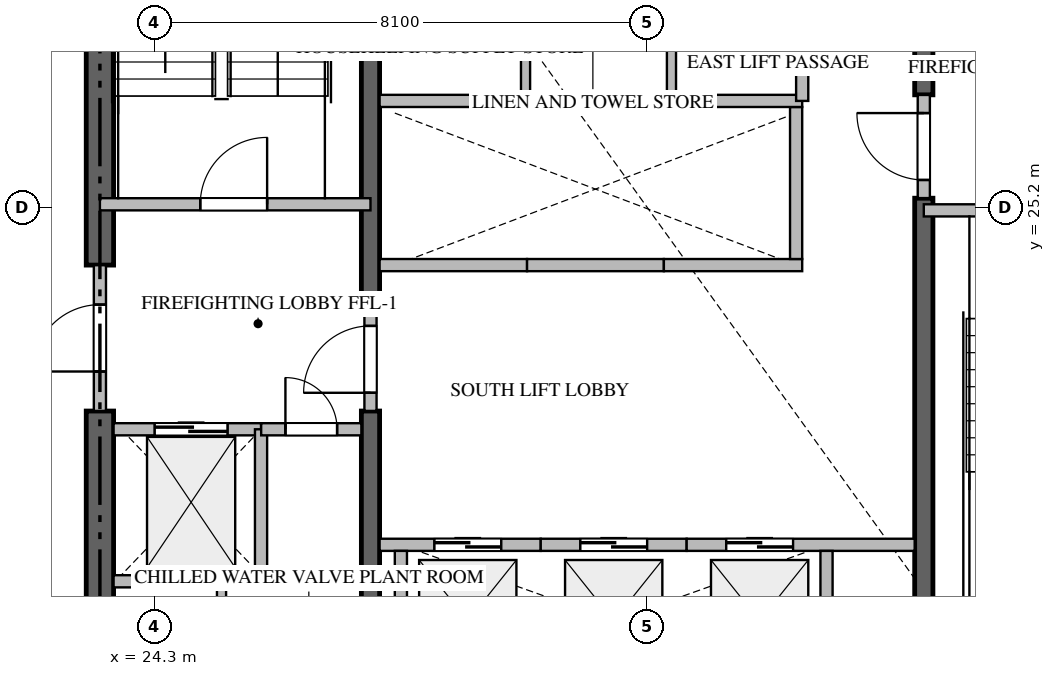
"""IFC4 building model, lengths in metres.
Left out: names, types, materials, properties, quantities, classifications, styles, units other than length and angle.
Written with IfcOpenShell. Run it as: python <this file> out.ifc"""

import sys

from ifc_helpers import new_model, si_unit, direction, frame, frame_2d, origin, place, context, subcontext, project, spatial, rectangle, extrude, source, transform, mapped, element, fill, save


model = new_model("IFC4")
c1 = context("Model", 3, precision=1e-05, world=origin(), true_north=direction((0.0, 1.0)))
c2 = subcontext(c1, "Body", "Model", "MODEL_VIEW")
j1 = project(units=[si_unit("LENGTHUNIT", "METRE"), si_unit("PLANEANGLEUNIT", "RADIAN")], contexts=[c1])
p1 = place(None, origin())
s1 = spatial("IfcSite", under=j1, at=p1, CompositionType="ELEMENT")
p2 = place(p1, origin())
s2 = spatial("IfcBuilding", under=s1, at=p2, CompositionType="ELEMENT")
p3 = place(p2, frame((0.0, 0.0, 60.45)))
s3 = spatial("IfcBuildingStorey", under=s2, at=p3, CompositionType="ELEMENT", Elevation=60.45)
p4 = place(p3, frame((23.4, 17.025, -0.26), z_axis=(0.0, 0.0, 1.0), x_axis=(0.0, 1.0, 0.0)))
e1 = element("IfcWall", 1, at=p4, inside=s3, PredefinedType="SHEAR", context=c2, shape_type="SweptSolid", body=[
    extrude(rectangle(XDim=4.825, YDim=0.45, at=frame_2d((2.413, 0.0))), origin(), (0.0, 0.0, 1.0), 3.748),
])
p5 = place(p3, frame((23.4, 24.25, -0.26), z_axis=(0.0, 0.0, 1.0), x_axis=(0.0, 1.0, 0.0)))
e2 = element("IfcWall", 2, at=p5, inside=s3, PredefinedType="SHEAR", context=c2, shape_type="SweptSolid", body=[
    extrude(rectangle(XDim=9.125, YDim=0.45, at=frame_2d((4.562, 0.0))), origin(), (0.0, 0.0, 1.0), 3.748),
])
p6 = place(p3, frame((27.85, 17.025, -0.26), z_axis=(0.0, 0.0, 1.0), x_axis=(0.0, 1.0, 0.0)))
e3 = element("IfcWall", 3, at=p6, inside=s3, PredefinedType="SHEAR", context=c2, shape_type="SweptSolid", body=[
    extrude(rectangle(XDim=4.825, YDim=0.3, at=frame_2d((2.413, 0.0))), origin(), (0.0, 0.0, 1.0), 3.748),
])
p7 = place(p3, frame((27.85, 23.55, -0.26), z_axis=(0.0, 0.0, 1.0), x_axis=(0.0, 1.0, 0.0)))
e4 = element("IfcWall", 4, at=p7, inside=s3, PredefinedType="SHEAR", context=c2, shape_type="SweptSolid", body=[
    extrude(rectangle(XDim=9.825, YDim=0.3, at=frame_2d((4.913, 0.0))), origin(), (0.0, 0.0, 1.0), 3.748),
])
p8 = place(p3, frame((36.95, 17.025, -0.26), z_axis=(0.0, 0.0, 1.0), x_axis=(0.0, 1.0, 0.0)))
e5 = element("IfcWall", 5, at=p8, inside=s3, PredefinedType="SHEAR", context=c2, shape_type="SweptSolid", body=[
    extrude(rectangle(XDim=8.325, YDim=0.3, at=frame_2d((4.163, 0.0))), origin(), (0.0, 0.0, 1.0), 3.748),
])
p9 = place(p3, frame((36.95, 27.05, -0.26), z_axis=(0.0, 0.0, 1.0), x_axis=(0.0, 1.0, 0.0)))
e6 = element("IfcWall", 6, at=p9, inside=s3, PredefinedType="SHEAR", context=c2, shape_type="SweptSolid", body=[
    extrude(rectangle(XDim=6.325, YDim=0.3, at=frame_2d((3.163, 0.0))), origin(), (0.0, 0.0, 1.0), 3.748),
])
p10 = place(p3, frame((23.4, 25.25, 0.0), z_axis=(0.0, 0.0, 1.0), x_axis=(1.0, 0.0, 0.0)))
e7 = element("IfcWall", 7, at=p10, inside=s3, PredefinedType="STANDARD", context=c2, shape_type="SweptSolid", body=[
    extrude(rectangle(XDim=4.45, YDim=0.2, at=frame_2d((2.225, 0.0))), origin(), (0.0, 0.0, 1.0), 3.49),
])
p11 = place(p10, frame((1.65, 0.0, 0.0)))
e8 = element("IfcOpeningElement", 8, at=p11, cuts=e7, PredefinedType="OPENING", context=c2, shape_type="SweptSolid", body=[
    extrude(rectangle(XDim=1.1, YDim=2.15, at=frame_2d((0.55, 1.075))), frame((0.0, 0.11, 0.0), z_axis=(0.0, -1.0, 0.0), x_axis=(1.0, 0.0, 0.0)), (0.0, 0.0, 1.0), 0.22),
])
p12 = place(p3, frame((36.95, 25.15, 0.0), z_axis=(0.0, 0.0, 1.0), x_axis=(1.0, 0.0, 0.0)))
e9 = element("IfcWall", 9, at=p12, inside=s3, PredefinedType="STANDARD", context=c2, shape_type="SweptSolid", body=[
    extrude(rectangle(XDim=4.45, YDim=0.2, at=frame_2d((2.225, 0.0))), origin(), (0.0, 0.0, 1.0), 3.49),
])
p13 = place(p12, frame((1.65, 0.0, 0.0)))
e10 = element("IfcOpeningElement", 10, at=p13, cuts=e9, PredefinedType="OPENING", context=c2, shape_type="SweptSolid", body=[
    extrude(rectangle(XDim=1.1, YDim=2.15, at=frame_2d((0.55, 1.075))), frame((0.0, 0.11, 0.0), z_axis=(0.0, -1.0, 0.0), x_axis=(1.0, 0.0, 0.0)), (0.0, 0.0, 1.0), 0.22),
])
p14 = place(p3, frame((23.625, 21.55, 0.0), z_axis=(0.0, 0.0, 1.0), x_axis=(1.0, 0.0, 0.0)))
e11 = element("IfcWall", 11, at=p14, inside=s3, PredefinedType="STANDARD", context=c2, shape_type="SweptSolid", body=[
    extrude(rectangle(XDim=2.425, YDim=0.2, at=frame_2d((1.212, 0.0))), origin(), (0.0, 0.0, 1.0), 3.49),
])
p15 = place(p14, frame((0.675, 0.0, 0.0)))
e12 = element("IfcOpeningElement", 12, at=p15, cuts=e11, PredefinedType="OPENING", context=c2, shape_type="SweptSolid", body=[
    extrude(rectangle(XDim=1.2, YDim=2.2, at=frame_2d((0.6, 1.1))), frame((0.0, 0.11, 0.0), z_axis=(0.0, -1.0, 0.0), x_axis=(1.0, 0.0, 0.0)), (0.0, 0.0, 1.0), 0.22),
])
p16 = place(p3, frame((28.0, 19.65, 0.0), z_axis=(0.0, 0.0, 1.0), x_axis=(1.0, 0.0, 0.0)))
e13 = element("IfcWall", 13, at=p16, inside=s3, PredefinedType="STANDARD", context=c2, shape_type="SweptSolid", body=[
    extrude(rectangle(XDim=2.65, YDim=0.2, at=frame_2d((1.325, 0.0))), origin(), (0.0, 0.0, 1.0), 3.49),
])
p17 = place(p16, frame((0.9, 0.0, 0.0)))
e14 = element("IfcOpeningElement", 14, at=p17, cuts=e13, PredefinedType="OPENING", context=c2, shape_type="SweptSolid", body=[
    extrude(rectangle(XDim=1.1, YDim=2.2, at=frame_2d((0.55, 1.1))), frame((0.0, 0.11, 0.0), z_axis=(0.0, -1.0, 0.0), x_axis=(1.0, 0.0, 0.0)), (0.0, 0.0, 1.0), 0.22),
])
p18 = place(p3, frame((28.35, 17.025, 0.0), z_axis=(0.0, 0.0, 1.0), x_axis=(0.0, 1.0, 0.0)))
e15 = element("IfcWall", 15, at=p18, inside=s3, PredefinedType="STANDARD", context=c2, shape_type="SweptSolid", body=[
    extrude(rectangle(XDim=2.525, YDim=0.2, at=frame_2d((1.263, 0.0))), origin(), (0.0, 0.0, 1.0), 3.49),
])
p19 = place(p3, frame((30.65, 19.65, 0.0), z_axis=(0.0, 0.0, 1.0), x_axis=(1.0, 0.0, 0.0)))
e16 = element("IfcWall", 16, at=p19, inside=s3, PredefinedType="STANDARD", context=c2, shape_type="SweptSolid", body=[
    extrude(rectangle(XDim=2.4, YDim=0.2, at=frame_2d((1.2, 0.0))), origin(), (0.0, 0.0, 1.0), 3.49),
])
p20 = place(p19, frame((0.65, 0.0, 0.0)))
e17 = element("IfcOpeningElement", 17, at=p20, cuts=e16, PredefinedType="OPENING", context=c2, shape_type="SweptSolid", body=[
    extrude(rectangle(XDim=1.1, YDim=2.2, at=frame_2d((0.55, 1.1))), frame((0.0, 0.11, 0.0), z_axis=(0.0, -1.0, 0.0), x_axis=(1.0, 0.0, 0.0)), (0.0, 0.0, 1.0), 0.22),
])
p21 = place(p3, frame((33.05, 19.65, 0.0), z_axis=(0.0, 0.0, 1.0), x_axis=(1.0, 0.0, 0.0)))
e18 = element("IfcWall", 18, at=p21, inside=s3, PredefinedType="STANDARD", context=c2, shape_type="SweptSolid", body=[
    extrude(rectangle(XDim=3.75, YDim=0.2, at=frame_2d((1.875, 0.0))), origin(), (0.0, 0.0, 1.0), 3.49),
])
p22 = place(p21, frame((0.65, 0.0, 0.0)))
e19 = element("IfcOpeningElement", 19, at=p22, cuts=e18, PredefinedType="OPENING", context=c2, shape_type="SweptSolid", body=[
    extrude(rectangle(XDim=1.1, YDim=2.2, at=frame_2d((0.55, 1.1))), frame((0.0, 0.11, 0.0), z_axis=(0.0, -1.0, 0.0), x_axis=(1.0, 0.0, 0.0)), (0.0, 0.0, 1.0), 0.22),
])
p23 = place(p3, frame((35.35, 17.025, 0.0), z_axis=(0.0, 0.0, 1.0), x_axis=(0.0, 1.0, 0.0)))
e20 = element("IfcWall", 20, at=p23, inside=s3, PredefinedType="STANDARD", context=c2, shape_type="SweptSolid", body=[
    extrude(rectangle(XDim=2.525, YDim=0.2, at=frame_2d((1.263, 0.0))), origin(), (0.0, 0.0, 1.0), 3.49),
])
p24 = place(p3, frame((28.0, 24.25, 0.0), z_axis=(0.0, 0.0, 1.0), x_axis=(1.0, 0.0, 0.0)))
e21 = element("IfcWall", 21, at=p24, inside=s3, PredefinedType="STANDARD", context=c2, shape_type="SweptSolid", body=[
    extrude(rectangle(XDim=2.425, YDim=0.2, at=frame_2d((1.212, 0.0))), origin(), (0.0, 0.0, 1.0), 3.49),
])
p25 = place(p3, frame((30.425, 24.25, 0.0), z_axis=(0.0, 0.0, 1.0), x_axis=(1.0, 0.0, 0.0)))
e22 = element("IfcWall", 22, at=p25, inside=s3, PredefinedType="STANDARD", context=c2, shape_type="SweptSolid", body=[
    extrude(rectangle(XDim=2.25, YDim=0.2, at=frame_2d((1.125, 0.0))), origin(), (0.0, 0.0, 1.0), 3.49),
])
p26 = place(p3, frame((32.675, 24.25, 0.0), z_axis=(0.0, 0.0, 1.0), x_axis=(1.0, 0.0, 0.0)))
e23 = element("IfcWall", 23, at=p26, inside=s3, PredefinedType="STANDARD", context=c2, shape_type="SweptSolid", body=[
    extrude(rectangle(XDim=2.275, YDim=0.2, at=frame_2d((1.137, 0.0))), origin(), (0.0, 0.0, 1.0), 3.49),
])
for number, where, z_axis, x_axis in (
    (24, (34.85, 24.35, 0.0), (0.0, 0.0, 1.0), (0.0, 1.0, 0.0)),
    (25, (26.05, 19.05, 0.0), (0.0, 0.0, 1.0), (0.0, 1.0, 0.0)),
):
    element("IfcWall", number, at=place(p3, frame(where, z_axis=z_axis, x_axis=x_axis)), inside=s3, PredefinedType="STANDARD", context=c2, shape_type="SweptSolid", body=[
        extrude(rectangle(XDim=2.5, YDim=0.2, at=frame_2d((1.25, 0.0))), origin(), (0.0, 0.0, 1.0), 3.49),
    ])
p27 = place(p3, frame((23.625, 19.05, 0.0), z_axis=(0.0, 0.0, 1.0), x_axis=(1.0, 0.0, 0.0)))
e26 = element("IfcWall", 26, at=p27, inside=s3, PredefinedType="STANDARD", context=c2, shape_type="SweptSolid", body=[
    extrude(rectangle(XDim=2.425, YDim=0.2, at=frame_2d((1.212, 0.0))), origin(), (0.0, 0.0, 1.0), 3.49),
])
p28 = place(p3, frame((26.052, 21.55, 0.0), z_axis=(0.0, 0.0, 1.0), x_axis=(1.0, 0.0, 0.0)))
e27 = element("IfcWall", 27, at=p28, inside=s3, PredefinedType="STANDARD", context=c2, shape_type="SweptSolid", body=[
    extrude(rectangle(XDim=1.648, YDim=0.2, at=frame_2d((0.824, 0.0))), origin(), (0.0, 0.0, 1.0), 3.49),
])
p29 = place(p28, frame((0.399, 0.0, 0.0)))
e28 = element("IfcOpeningElement", 28, at=p29, cuts=e27, PredefinedType="OPENING", context=c2, shape_type="SweptSolid", body=[
    extrude(rectangle(XDim=0.85, YDim=2.1, at=frame_2d((0.425, 1.05))), frame((0.0, 0.11, 0.0), z_axis=(0.0, -1.0, 0.0), x_axis=(1.0, 0.0, 0.0)), (0.0, 0.0, 1.0), 0.22),
])
p30 = place(p3, frame((23.4, 21.852, 0.0), z_axis=(0.0, 0.0, 1.0), x_axis=(0.0, 1.0, 0.0)))
e29 = element("IfcWall", 29, at=p30, inside=s3, PredefinedType="STANDARD", context=c2, shape_type="SweptSolid", body=[
    extrude(rectangle(XDim=2.396, YDim=0.2, at=frame_2d((1.198, 0.0))), origin(), (0.0, 0.0, 1.0), 3.49),
])
p31 = place(p30, frame((0.648, 0.0, 0.0)))
e30 = element("IfcOpeningElement", 30, at=p31, cuts=e29, PredefinedType="OPENING", context=c2, shape_type="SweptSolid", body=[
    extrude(rectangle(XDim=1.1, YDim=2.15, at=frame_2d((0.55, 1.075))), frame((0.0, 0.11, 0.0), z_axis=(0.0, -1.0, 0.0), x_axis=(1.0, 0.0, 0.0)), (0.0, 0.0, 1.0), 0.22),
])
p32 = place(p3, frame((27.85, 21.852, 0.0), z_axis=(0.0, 0.0, 1.0), x_axis=(0.0, 1.0, 0.0)))
e31 = element("IfcWall", 31, at=p32, inside=s3, PredefinedType="STANDARD", context=c2, shape_type="SweptSolid", body=[
    extrude(rectangle(XDim=1.696, YDim=0.2, at=frame_2d((0.848, 0.0))), origin(), (0.0, 0.0, 1.0), 3.49),
])
p33 = place(p32, frame((0.298, 0.0, 0.0)))
e32 = element("IfcOpeningElement", 32, at=p33, cuts=e31, PredefinedType="OPENING", context=c2, shape_type="SweptSolid", body=[
    extrude(rectangle(XDim=1.1, YDim=2.15, at=frame_2d((0.55, 1.075))), frame((0.0, 0.11, 0.0), z_axis=(0.0, -1.0, 0.0), x_axis=(1.0, 0.0, 0.0)), (0.0, 0.0, 1.0), 0.22),
])
p34 = place(p3, frame((36.95, 25.352, 0.0), z_axis=(0.0, 0.0, 1.0), x_axis=(0.0, 1.0, 0.0)))
e33 = element("IfcWall", 33, at=p34, inside=s3, PredefinedType="STANDARD", context=c2, shape_type="SweptSolid", body=[
    extrude(rectangle(XDim=1.696, YDim=0.2, at=frame_2d((0.848, 0.0))), origin(), (0.0, 0.0, 1.0), 3.49),
])
p35 = place(p34, frame((0.298, 0.0, 0.0)))
e34 = element("IfcOpeningElement", 34, at=p35, cuts=e33, PredefinedType="OPENING", context=c2, shape_type="SweptSolid", body=[
    extrude(rectangle(XDim=1.1, YDim=2.15, at=frame_2d((0.55, 1.075))), frame((0.0, 0.11, 0.0), z_axis=(0.0, -1.0, 0.0), x_axis=(1.0, 0.0, 0.0)), (0.0, 0.0, 1.0), 0.22),
])
p36 = place(p3, frame((28.0, 26.95, 0.0), z_axis=(0.0, 0.0, 1.0), x_axis=(1.0, 0.0, 0.0)))
e35 = element("IfcWall", 35, at=p36, inside=s3, PredefinedType="STANDARD", context=c2, shape_type="SweptSolid", body=[
    extrude(rectangle(XDim=6.95, YDim=0.2, at=frame_2d((3.475, 0.0))), origin(), (0.0, 0.0, 1.0), 3.49),
])
p37 = place(p3, frame((25.4, 17.025, 0.0), z_axis=(0.0, 0.0, 1.0), x_axis=(0.0, 1.0, 0.0)))
e36 = element("IfcWall", 36, at=p37, inside=s3, PredefinedType="PARTITIONING", context=c2, shape_type="SweptSolid", body=[
    extrude(rectangle(XDim=2.025, YDim=0.15, at=frame_2d((1.013, 0.0))), origin(), (0.0, 0.0, 1.0), 3.49),
])
p38 = place(p37, frame((0.588, 0.0, 0.0)))
e37 = element("IfcOpeningElement", 37, at=p38, cuts=e36, PredefinedType="OPENING", context=c2, shape_type="SweptSolid", body=[
    extrude(rectangle(XDim=0.85, YDim=2.1, at=frame_2d((0.425, 1.05))), frame((0.0, 0.085, 0.0), z_axis=(0.0, -1.0, 0.0), x_axis=(1.0, 0.0, 0.0)), (0.0, 0.0, 1.0), 0.17),
])
p39 = place(p3, frame((34.95, 26.95, 0.0), z_axis=(0.0, 0.0, 1.0), x_axis=(0.0, 1.0, 0.0)))
e38 = element("IfcWall", 38, at=p39, inside=s3, PredefinedType="STANDARD", context=c2, shape_type="SweptSolid", body=[
    extrude(rectangle(XDim=3.6, YDim=0.2, at=frame_2d((1.8, 0.0))), origin(), (0.0, 0.0, 1.0), 3.49),
])
p40 = place(p39, frame((1.35, 0.0, 0.0)))
e39 = element("IfcOpeningElement", 39, at=p40, cuts=e38, PredefinedType="OPENING", context=c2, shape_type="SweptSolid", body=[
    extrude(rectangle(XDim=0.9, YDim=2.1, at=frame_2d((0.45, 1.05))), frame((0.0, 0.11, 0.0), z_axis=(0.0, -1.0, 0.0), x_axis=(1.0, 0.0, 0.0)), (0.0, 0.0, 1.0), 0.22),
])
p41 = place(p3, frame((32.8, 26.95, 0.0), z_axis=(0.0, 0.0, 1.0), x_axis=(0.0, 1.0, 0.0)))
e40 = element("IfcWall", 40, at=p41, inside=s3, PredefinedType="PARTITIONING", context=c2, shape_type="SweptSolid", body=[
    extrude(rectangle(XDim=3.6, YDim=0.15, at=frame_2d((1.8, 0.0))), origin(), (0.0, 0.0, 1.0), 3.49),
])
p42 = place(p41, frame((1.375, 0.0, 0.0)))
e41 = element("IfcOpeningElement", 41, at=p42, cuts=e40, PredefinedType="OPENING", context=c2, shape_type="SweptSolid", body=[
    extrude(rectangle(XDim=0.85, YDim=2.1, at=frame_2d((0.425, 1.05))), frame((0.0, 0.085, 0.0), z_axis=(0.0, -1.0, 0.0), x_axis=(1.0, 0.0, 0.0)), (0.0, 0.0, 1.0), 0.17),
])
p43 = place(p3, frame((30.4, 26.95, 0.0), z_axis=(0.0, 0.0, 1.0), x_axis=(0.0, 1.0, 0.0)))
e42 = element("IfcWall", 42, at=p43, inside=s3, PredefinedType="PARTITIONING", context=c2, shape_type="SweptSolid", body=[
    extrude(rectangle(XDim=3.6, YDim=0.15, at=frame_2d((1.8, 0.0))), origin(), (0.0, 0.0, 1.0), 3.49),
])
p44 = place(p43, frame((1.375, 0.0, 0.0)))
e43 = element("IfcOpeningElement", 43, at=p44, cuts=e42, PredefinedType="OPENING", context=c2, shape_type="SweptSolid", body=[
    extrude(rectangle(XDim=0.85, YDim=2.1, at=frame_2d((0.425, 1.05))), frame((0.0, 0.085, 0.0), z_axis=(0.0, -1.0, 0.0), x_axis=(1.0, 0.0, 0.0)), (0.0, 0.0, 1.0), 0.17),
])
m1 = source(origin(), c2, "Body", "SweptSolid", [
    extrude(rectangle(XDim=1.1, YDim=2.15, at=frame_2d((0.55, 1.075))), frame((0.0, 0.025, 0.0), z_axis=(0.0, -1.0, 0.0), x_axis=(1.0, 0.0, 0.0)), (0.0, 0.0, 1.0), 0.05),
])
p45 = place(p11, origin())
e44 = element("IfcDoor", 44, at=p45, inside=s3, OperationType="SINGLE_SWING_RIGHT", PredefinedType="DOOR", context=c2, shape_type="MappedRepresentation", body=[
    mapped(m1, transform((0.0, 0.0, 0.0), scale=1.0)),
])
fill(e8, e44)
m2 = source(origin(), c2, "Body", "SweptSolid", [
    extrude(rectangle(XDim=1.2, YDim=2.2, at=frame_2d((0.6, 1.1))), frame((0.0, 0.025, 0.0), z_axis=(0.0, -1.0, 0.0), x_axis=(1.0, 0.0, 0.0)), (0.0, 0.0, 1.0), 0.05),
])
p46 = place(p15, origin())
e45 = element("IfcDoor", 45, at=p46, inside=s3, OperationType="DOUBLE_DOOR_SLIDING", PredefinedType="DOOR", context=c2, shape_type="MappedRepresentation", body=[
    mapped(m2, transform((0.0, 0.0, 0.0), scale=1.0)),
])
fill(e12, e45)
m3 = source(origin(), c2, "Body", "SweptSolid", [
    extrude(rectangle(XDim=1.1, YDim=2.2, at=frame_2d((0.55, 1.1))), frame((0.0, 0.025, 0.0), z_axis=(0.0, -1.0, 0.0), x_axis=(1.0, 0.0, 0.0)), (0.0, 0.0, 1.0), 0.05),
])
p47 = place(p17, origin())
e46 = element("IfcDoor", 46, at=p47, inside=s3, OperationType="DOUBLE_DOOR_SLIDING", PredefinedType="DOOR", context=c2, shape_type="MappedRepresentation", body=[
    mapped(m3, transform((0.0, 0.0, 0.0), scale=1.0)),
])
fill(e14, e46)
p48 = place(p20, origin())
e47 = element("IfcDoor", 47, at=p48, inside=s3, OperationType="DOUBLE_DOOR_SLIDING", PredefinedType="DOOR", context=c2, shape_type="MappedRepresentation", body=[
    mapped(m3, transform((0.0, 0.0, 0.0), scale=1.0)),
])
fill(e17, e47)
p49 = place(p22, origin())
e48 = element("IfcDoor", 48, at=p49, inside=s3, OperationType="DOUBLE_DOOR_SLIDING", PredefinedType="DOOR", context=c2, shape_type="MappedRepresentation", body=[
    mapped(m3, transform((0.0, 0.0, 0.0), scale=1.0)),
])
fill(e19, e48)
m4 = source(origin(), c2, "Body", "SweptSolid", [
    extrude(rectangle(XDim=0.85, YDim=2.1, at=frame_2d((0.425, 1.05))), frame((0.0, 0.025, 0.0), z_axis=(0.0, -1.0, 0.0), x_axis=(1.0, 0.0, 0.0)), (0.0, 0.0, 1.0), 0.05),
])
p50 = place(p29, origin())
e49 = element("IfcDoor", 49, at=p50, inside=s3, OperationType="SINGLE_SWING_LEFT", PredefinedType="DOOR", context=c2, shape_type="MappedRepresentation", body=[
    mapped(m4, transform((0.0, 0.0, 0.0), scale=1.0)),
])
fill(e28, e49)
p51 = place(p31, origin())
e50 = element("IfcDoor", 50, at=p51, inside=s3, OperationType="SINGLE_SWING_LEFT", PredefinedType="DOOR", context=c2, shape_type="MappedRepresentation", body=[
    mapped(m1, transform((0.0, 0.0, 0.0), scale=1.0)),
])
fill(e30, e50)
p52 = place(p33, origin())
e51 = element("IfcDoor", 51, at=p52, inside=s3, OperationType="SINGLE_SWING_LEFT", PredefinedType="DOOR", context=c2, shape_type="MappedRepresentation", body=[
    mapped(m1, transform((0.0, 0.0, 0.0), scale=1.0)),
])
fill(e32, e51)
p53 = place(p35, origin())
e52 = element("IfcDoor", 52, at=p53, inside=s3, OperationType="SINGLE_SWING_RIGHT", PredefinedType="DOOR", context=c2, shape_type="MappedRepresentation", body=[
    mapped(m1, transform((0.0, 0.0, 0.0), scale=1.0)),
])
fill(e34, e52)
save(model, sys.argv[1])
